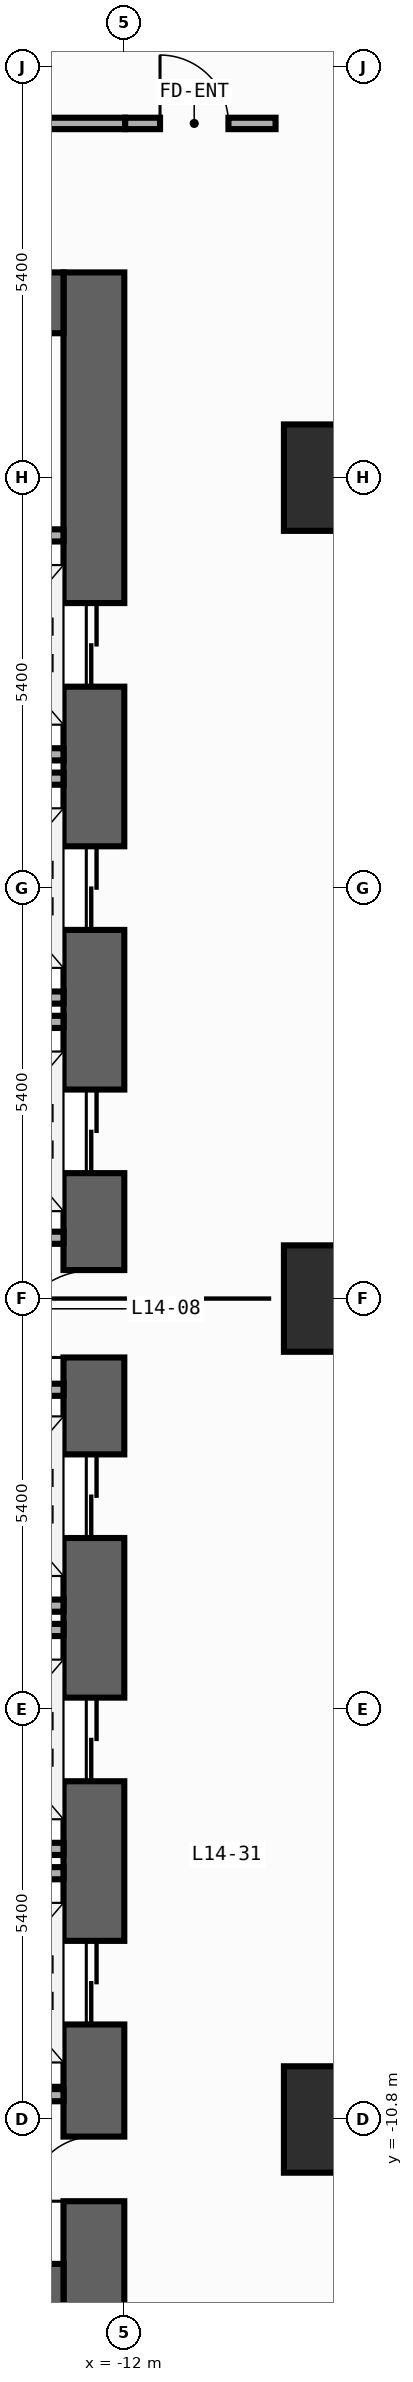
"""IFC4 building model, lengths in metres.
Left out: names, types, materials, properties, quantities, classifications, styles, units other than length and angle.
Written with IfcOpenShell. Run it as: python <this file> out.ifc"""

import sys

from ifc_helpers import new_model, si_unit, direction, frame, frame_2d, origin, origin_2d, place, context, subcontext, project, spatial, rectangle, extrude, element, fill, save


model = new_model("IFC4")
c1 = context("Model", 3, precision=1e-05, world=origin(), true_north=direction((0.0, 1.0)))
c2 = subcontext(c1, "Body", "Model", "MODEL_VIEW")
j1 = project(units=[si_unit("LENGTHUNIT", "METRE"), si_unit("PLANEANGLEUNIT", "RADIAN")], contexts=[c1])
p1 = place(None, origin())
s1 = spatial("IfcSite", under=j1, at=p1, CompositionType="ELEMENT")
p2 = place(p1, origin())
s2 = spatial("IfcBuilding", under=s1, at=p2, CompositionType="ELEMENT")
p3 = place(p2, frame((0.0, 0.0, 59.6)))
s3 = spatial("IfcBuildingStorey", under=s2, at=p3, CompositionType="ELEMENT", Elevation=59.6)
p4 = place(p3, frame((-12.4, -13.5, 0.0), z_axis=(0.0, 0.0, 1.0), x_axis=(0.0, 1.0, 0.0)))
e1 = element("IfcWall", 1, at=p4, inside=s3, PredefinedType="SHEAR", context=c2, shape_type="SweptSolid", body=[
    extrude(rectangle(XDim=27.0, YDim=0.8, at=frame_2d((13.5, 0.0))), origin(), (0.0, 0.0, 1.0), 3.94),
])
p5 = place(p4, frame((21.55, 0.0, 0.0)))
e2 = element("IfcOpeningElement", 2, at=p5, cuts=e1, PredefinedType="OPENING", context=c2, shape_type="SweptSolid", body=[
    extrude(rectangle(XDim=1.1, YDim=2.2, at=frame_2d((0.55, 1.1))), frame((0.0, 0.41, 0.0), z_axis=(0.0, -1.0, 0.0), x_axis=(1.0, 0.0, 0.0)), (0.0, 0.0, 1.0), 0.82),
])
p6 = place(p4, frame((18.35, 0.0, 0.0)))
e3 = element("IfcOpeningElement", 3, at=p6, cuts=e1, PredefinedType="OPENING", context=c2, shape_type="SweptSolid", body=[
    extrude(rectangle(XDim=1.1, YDim=2.2, at=frame_2d((0.55, 1.1))), frame((0.0, 0.41, 0.0), z_axis=(0.0, -1.0, 0.0), x_axis=(1.0, 0.0, 0.0)), (0.0, 0.0, 1.0), 0.82),
])
p7 = place(p4, frame((15.15, 0.0, 0.0)))
e4 = element("IfcOpeningElement", 4, at=p7, cuts=e1, PredefinedType="OPENING", context=c2, shape_type="SweptSolid", body=[
    extrude(rectangle(XDim=1.1, YDim=2.2, at=frame_2d((0.55, 1.1))), frame((0.0, 0.41, 0.0), z_axis=(0.0, -1.0, 0.0), x_axis=(1.0, 0.0, 0.0)), (0.0, 0.0, 1.0), 0.82),
])
p8 = place(p4, frame((10.35, 0.0, 0.0)))
e5 = element("IfcOpeningElement", 5, at=p8, cuts=e1, PredefinedType="OPENING", context=c2, shape_type="SweptSolid", body=[
    extrude(rectangle(XDim=1.1, YDim=2.2, at=frame_2d((0.55, 1.1))), frame((0.0, 0.41, 0.0), z_axis=(0.0, -1.0, 0.0), x_axis=(1.0, 0.0, 0.0)), (0.0, 0.0, 1.0), 0.82),
])
p9 = place(p4, frame((7.15, 0.0, 0.0)))
e6 = element("IfcOpeningElement", 6, at=p9, cuts=e1, PredefinedType="OPENING", context=c2, shape_type="SweptSolid", body=[
    extrude(rectangle(XDim=1.1, YDim=2.2, at=frame_2d((0.55, 1.1))), frame((0.0, 0.41, 0.0), z_axis=(0.0, -1.0, 0.0), x_axis=(1.0, 0.0, 0.0)), (0.0, 0.0, 1.0), 0.82),
])
p10 = place(p4, frame((3.95, 0.0, 0.0)))
e7 = element("IfcOpeningElement", 7, at=p10, cuts=e1, PredefinedType="OPENING", context=c2, shape_type="SweptSolid", body=[
    extrude(rectangle(XDim=1.1, YDim=2.2, at=frame_2d((0.55, 1.1))), frame((0.0, 0.41, 0.0), z_axis=(0.0, -1.0, 0.0), x_axis=(1.0, 0.0, 0.0)), (0.0, 0.0, 1.0), 0.82),
])
p11 = place(p4, frame((12.725, 0.0, 0.0)))
e8 = element("IfcOpeningElement", 8, at=p11, cuts=e1, PredefinedType="OPENING", context=c2, shape_type="SweptSolid", body=[
    extrude(rectangle(XDim=1.15, YDim=2.2, at=frame_2d((0.575, 1.1))), frame((0.0, 0.41, 0.0), z_axis=(0.0, -1.0, 0.0), x_axis=(1.0, 0.0, 0.0)), (0.0, 0.0, 1.0), 0.82),
])
p12 = place(p4, frame((1.625, 0.0, 0.0)))
e9 = element("IfcOpeningElement", 9, at=p12, cuts=e1, PredefinedType="OPENING", context=c2, shape_type="SweptSolid", body=[
    extrude(rectangle(XDim=0.85, YDim=2.1, at=frame_2d((0.425, 1.05))), frame((0.0, 0.41, 0.0), z_axis=(0.0, -1.0, 0.0), x_axis=(1.0, 0.0, 0.0)), (0.0, 0.0, 1.0), 0.82),
])
for number, where, z_axis, x_axis in (
    (10, (-19.6, -13.1, 0.0), (0.0, 0.0, 1.0), (1.0, 0.0, 0.0)),
    (11, (-19.6, 13.1, 0.0), (0.0, 0.0, 1.0), (1.0, 0.0, 0.0)),
):
    element("IfcWall", number, at=place(p3, frame(where, z_axis=z_axis, x_axis=x_axis)), inside=s3, PredefinedType="SHEAR", context=c2, shape_type="SweptSolid", body=[
        extrude(rectangle(XDim=6.8, YDim=0.8, at=frame_2d((3.4, 0.0))), origin(), (0.0, 0.0, 1.0), 3.94),
    ])
for number, where, z_axis, x_axis in (
    (12, (-9.2, -10.8, 0.0), (0.0, 0.0, 1.0), (1.0, 0.0, 0.0)),
    (13, (-9.2, 0.0, 0.0), (0.0, 0.0, 1.0), (1.0, 0.0, 0.0)),
    (14, (-9.2, 10.8, 0.0), (0.0, 0.0, 1.0), (1.0, 0.0, 0.0)),
):
    element("IfcColumn", number, at=place(p3, frame(where, z_axis=z_axis, x_axis=x_axis)), inside=s3, PredefinedType="COLUMN", context=c2, shape_type="SweptSolid", body=[
        extrude(rectangle(XDim=1.4, YDim=1.4, at=origin_2d()), origin(), (0.0, 0.0, 1.0), 4.2),
    ])
for number, where, z_axis, x_axis in (
    (15, (-14.99, 7.16, 0.0), (0.0, 0.0, 1.0), (1.0, 0.0, 0.0)),
    (16, (-14.99, 10.04, 0.0), (0.0, 0.0, 1.0), (1.0, 0.0, 0.0)),
    (17, (-14.99, 3.96, 0.0), (0.0, 0.0, 1.0), (1.0, 0.0, 0.0)),
    (18, (-14.99, 6.84, 0.0), (0.0, 0.0, 1.0), (1.0, 0.0, 0.0)),
    (19, (-14.99, 3.64, 0.0), (0.0, 0.0, 1.0), (1.0, 0.0, 0.0)),
    (20, (-14.99, -4.04, 0.0), (0.0, 0.0, 1.0), (1.0, 0.0, 0.0)),
    (21, (-14.99, -7.24, 0.0), (0.0, 0.0, 1.0), (1.0, 0.0, 0.0)),
    (22, (-14.99, -4.36, 0.0), (0.0, 0.0, 1.0), (1.0, 0.0, 0.0)),
    (23, (-14.99, -7.56, 0.0), (0.0, 0.0, 1.0), (1.0, 0.0, 0.0)),
):
    element("IfcWall", number, at=place(p3, frame(where, z_axis=z_axis, x_axis=x_axis)), inside=s3, PredefinedType="STANDARD", context=c2, shape_type="SweptSolid", body=[
        extrude(rectangle(XDim=2.19, YDim=0.16, at=frame_2d((1.095, 0.0))), origin(), (0.0, 0.0, 1.0), 3.94),
    ])
for number, where, z_axis, x_axis in (
    (24, (-15.4, 0.8, 0.0), (0.0, 0.0, 1.0), (1.0, 0.0, 0.0)),
    (25, (-15.4, -1.2, 0.0), (0.0, 0.0, 1.0), (1.0, 0.0, 0.0)),
    (26, (-15.4, -10.48, 0.0), (0.0, 0.0, 1.0), (1.0, 0.0, 0.0)),
):
    element("IfcWall", number, at=place(p3, frame(where, z_axis=z_axis, x_axis=x_axis)), inside=s3, PredefinedType="STANDARD", context=c2, shape_type="SweptSolid", body=[
        extrude(rectangle(XDim=2.6, YDim=0.16, at=frame_2d((1.3, 0.0))), origin(), (0.0, 0.0, 1.0), 3.94),
    ])
p13 = place(p3, frame((-11.99, 15.46, 0.0), z_axis=(0.0, 0.0, 1.0), x_axis=(1.0, 0.0, 0.0)))
e27 = element("IfcWall", 27, at=p13, inside=s3, PredefinedType="PARTITIONING", context=c2, shape_type="SweptSolid", body=[
    extrude(rectangle(XDim=1.98, YDim=0.15, at=frame_2d((0.99, 0.0))), origin(), (0.0, 0.0, 1.0), 3.94),
])
p14 = place(p13, frame((0.46, 0.0, 0.0)))
e28 = element("IfcOpeningElement", 28, at=p14, cuts=e27, PredefinedType="OPENING", context=c2, shape_type="SweptSolid", body=[
    extrude(rectangle(XDim=0.9, YDim=2.15, at=frame_2d((0.45, 1.075))), frame((0.0, 0.085, 0.0), z_axis=(0.0, -1.0, 0.0), x_axis=(1.0, 0.0, 0.0)), (0.0, 0.0, 1.0), 0.17),
])
p15 = place(p3, frame((-20.64, 15.46, 0.0), z_axis=(0.0, 0.0, 1.0), x_axis=(1.0, 0.0, 0.0)))
e29 = element("IfcWall", 29, at=p15, inside=s3, PredefinedType="PARTITIONING", context=c2, shape_type="SweptSolid", body=[
    extrude(rectangle(XDim=8.65, YDim=0.15, at=frame_2d((4.325, 0.0))), origin(), (0.0, 0.0, 1.0), 3.94),
])
p16 = place(p15, frame((2.871, 0.0, 0.0)))
e30 = element("IfcOpeningElement", 30, at=p16, cuts=e29, PredefinedType="OPENING", context=c2, shape_type="SweptSolid", body=[
    extrude(rectangle(XDim=0.9, YDim=2.15, at=frame_2d((0.45, 1.075))), frame((0.0, 0.085, 0.0), z_axis=(0.0, -1.0, 0.0), x_axis=(1.0, 0.0, 0.0)), (0.0, 0.0, 1.0), 0.17),
])
p17 = place(p5, origin())
e31 = element("IfcDoor", 31, at=p17, inside=s3, OperationType="DOUBLE_DOOR_SLIDING", PredefinedType="DOOR", context=c2, shape_type="SweptSolid", body=[
    extrude(rectangle(XDim=1.1, YDim=2.2, at=frame_2d((0.55, 1.1))), frame((0.0, 0.025, 0.0), z_axis=(0.0, -1.0, 0.0), x_axis=(1.0, 0.0, 0.0)), (0.0, 0.0, 1.0), 0.05),
])
fill(e2, e31)
p18 = place(p6, origin())
e32 = element("IfcDoor", 32, at=p18, inside=s3, OperationType="DOUBLE_DOOR_SLIDING", PredefinedType="DOOR", context=c2, shape_type="SweptSolid", body=[
    extrude(rectangle(XDim=1.1, YDim=2.2, at=frame_2d((0.55, 1.1))), frame((0.0, 0.025, 0.0), z_axis=(0.0, -1.0, 0.0), x_axis=(1.0, 0.0, 0.0)), (0.0, 0.0, 1.0), 0.05),
])
fill(e3, e32)
p19 = place(p7, origin())
e33 = element("IfcDoor", 33, at=p19, inside=s3, OperationType="DOUBLE_DOOR_SLIDING", PredefinedType="DOOR", context=c2, shape_type="SweptSolid", body=[
    extrude(rectangle(XDim=1.1, YDim=2.2, at=frame_2d((0.55, 1.1))), frame((0.0, 0.025, 0.0), z_axis=(0.0, -1.0, 0.0), x_axis=(1.0, 0.0, 0.0)), (0.0, 0.0, 1.0), 0.05),
])
fill(e4, e33)
p20 = place(p8, origin())
e34 = element("IfcDoor", 34, at=p20, inside=s3, OperationType="DOUBLE_DOOR_SLIDING", PredefinedType="DOOR", context=c2, shape_type="SweptSolid", body=[
    extrude(rectangle(XDim=1.1, YDim=2.2, at=frame_2d((0.55, 1.1))), frame((0.0, 0.025, 0.0), z_axis=(0.0, -1.0, 0.0), x_axis=(1.0, 0.0, 0.0)), (0.0, 0.0, 1.0), 0.05),
])
fill(e5, e34)
p21 = place(p9, origin())
e35 = element("IfcDoor", 35, at=p21, inside=s3, OperationType="DOUBLE_DOOR_SLIDING", PredefinedType="DOOR", context=c2, shape_type="SweptSolid", body=[
    extrude(rectangle(XDim=1.1, YDim=2.2, at=frame_2d((0.55, 1.1))), frame((0.0, 0.025, 0.0), z_axis=(0.0, -1.0, 0.0), x_axis=(1.0, 0.0, 0.0)), (0.0, 0.0, 1.0), 0.05),
])
fill(e6, e35)
p22 = place(p10, origin())
e36 = element("IfcDoor", 36, at=p22, inside=s3, OperationType="DOUBLE_DOOR_SLIDING", PredefinedType="DOOR", context=c2, shape_type="SweptSolid", body=[
    extrude(rectangle(XDim=1.1, YDim=2.2, at=frame_2d((0.55, 1.1))), frame((0.0, 0.025, 0.0), z_axis=(0.0, -1.0, 0.0), x_axis=(1.0, 0.0, 0.0)), (0.0, 0.0, 1.0), 0.05),
])
fill(e7, e36)
p23 = place(p11, origin())
e37 = element("IfcDoor", 37, at=p23, inside=s3, OperationType="SINGLE_SWING_LEFT", PredefinedType="DOOR", context=c2, shape_type="SweptSolid", body=[
    extrude(rectangle(XDim=1.15, YDim=2.2, at=frame_2d((0.575, 1.1))), frame((0.0, 0.025, 0.0), z_axis=(0.0, -1.0, 0.0), x_axis=(1.0, 0.0, 0.0)), (0.0, 0.0, 1.0), 0.05),
])
fill(e8, e37)
p24 = place(p12, origin())
e38 = element("IfcDoor", 38, at=p24, inside=s3, OperationType="SINGLE_SWING_LEFT", PredefinedType="DOOR", context=c2, shape_type="SweptSolid", body=[
    extrude(rectangle(XDim=0.85, YDim=2.1, at=frame_2d((0.425, 1.05))), frame((0.0, 0.025, 0.0), z_axis=(0.0, -1.0, 0.0), x_axis=(1.0, 0.0, 0.0)), (0.0, 0.0, 1.0), 0.05),
])
fill(e9, e38)
p25 = place(p14, origin())
e39 = element("IfcDoor", 39, at=p25, inside=s3, OperationType="SINGLE_SWING_LEFT", PredefinedType="DOOR", context=c2, shape_type="SweptSolid", body=[
    extrude(rectangle(XDim=0.9, YDim=2.15, at=frame_2d((0.45, 1.075))), frame((0.0, 0.025, 0.0), z_axis=(0.0, -1.0, 0.0), x_axis=(1.0, 0.0, 0.0)), (0.0, 0.0, 1.0), 0.05),
])
fill(e28, e39)
save(model, sys.argv[1])
